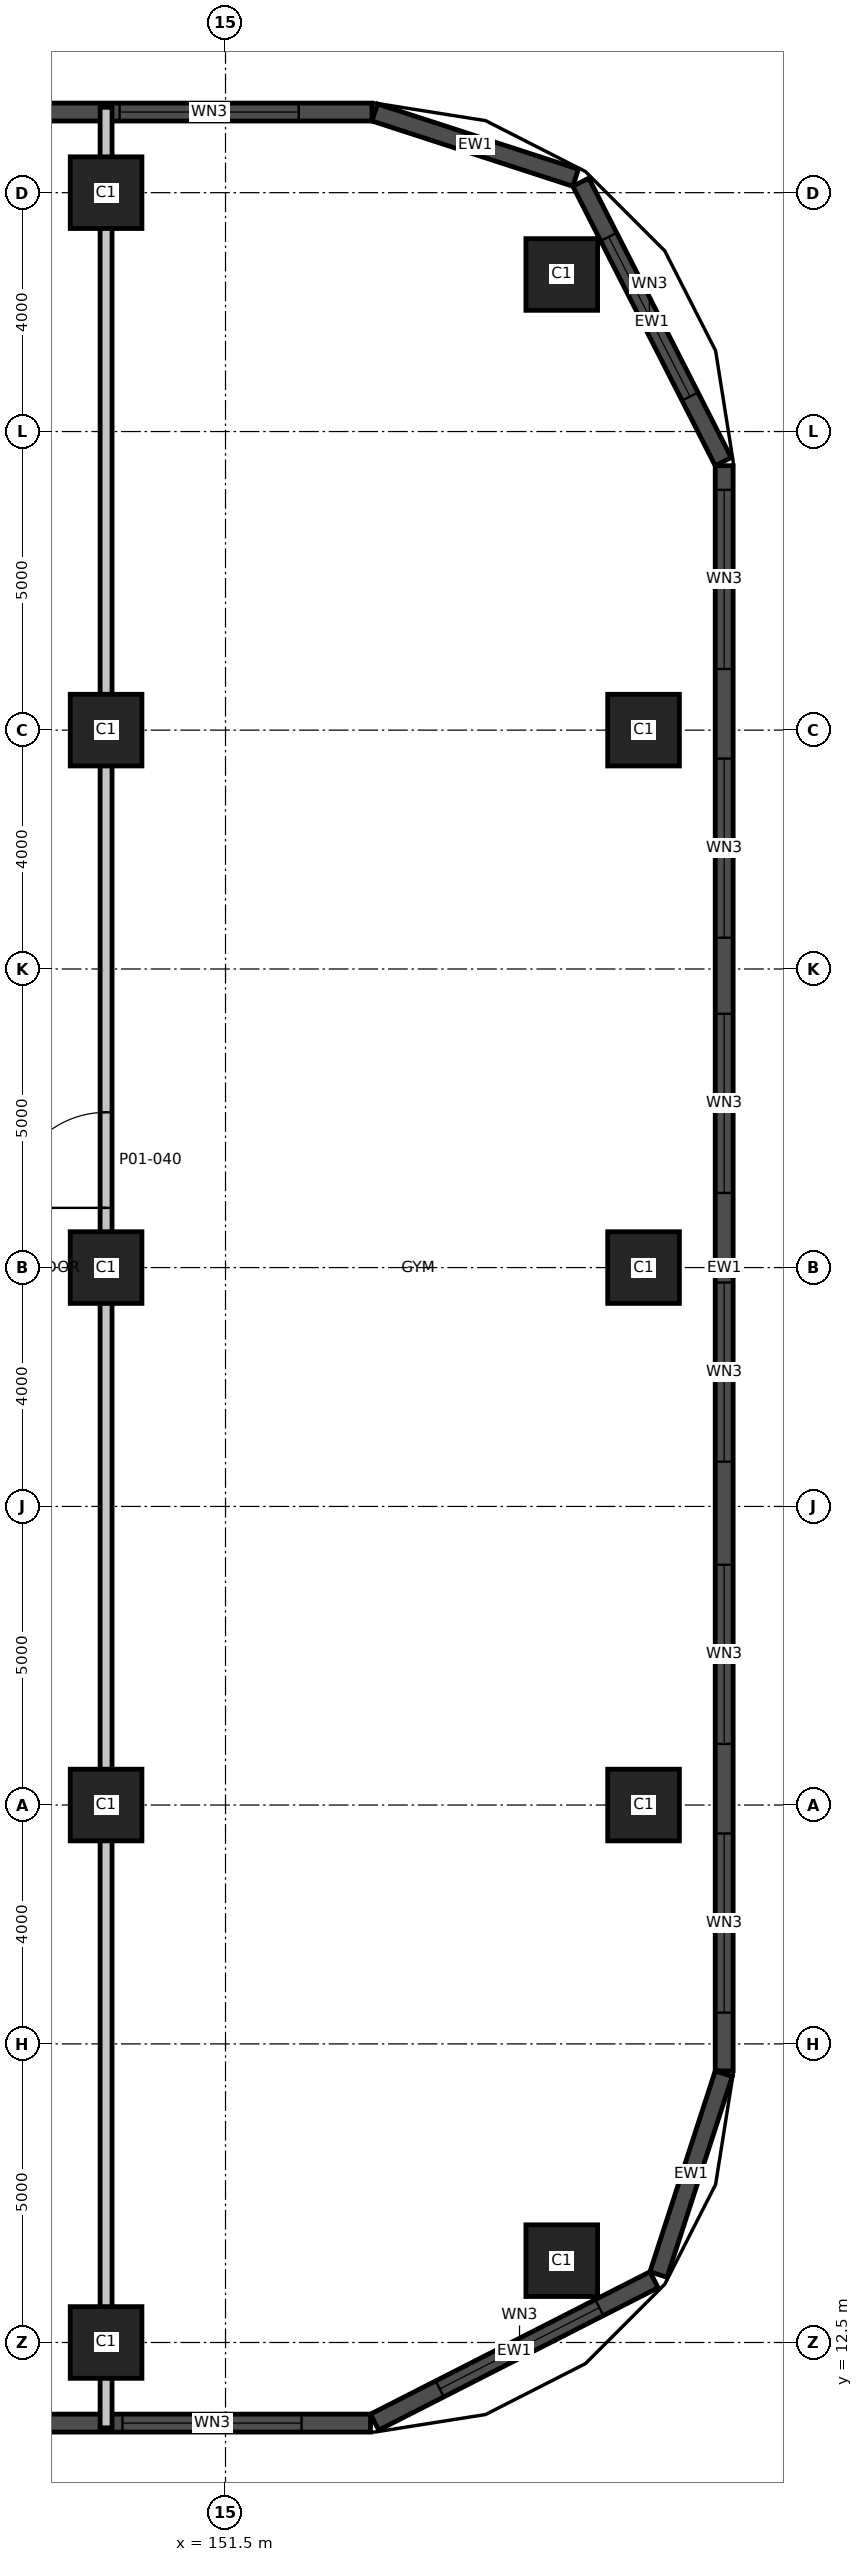
"""IFC4 building model, lengths in metres.
Left out: names, types, materials, properties, quantities, classifications, styles, units other than length and angle.
Written with IfcOpenShell. Run it as: python <this file> out.ifc"""

import sys

from ifc_helpers import new_model, si_unit, direction, frame, frame_2d, origin, origin_2d, place, context, subcontext, project, spatial, rectangle, extrude, element, fill, save


model = new_model("IFC4")
c1 = context("Model", 3, precision=1e-05, world=origin(), true_north=direction((0.0, 1.0)))
c2 = subcontext(c1, "Body", "Model", "MODEL_VIEW")
j1 = project(units=[si_unit("LENGTHUNIT", "METRE"), si_unit("PLANEANGLEUNIT", "RADIAN")], contexts=[c1])
p1 = place(None, origin())
s1 = spatial("IfcSite", under=j1, at=p1, CompositionType="ELEMENT")
p2 = place(p1, origin())
s2 = spatial("IfcBuilding", under=s1, at=p2, CompositionType="ELEMENT")
p3 = place(p2, frame((0.0, 0.0, 8.0)))
s3 = spatial("IfcBuildingStorey", under=s2, at=p3, CompositionType="ELEMENT", Elevation=8.0)
for number, where, z_axis, x_axis in (
    (1, (149.5, 12.5, 0.0), (0.0, 0.0, 1.0), (1.0, 0.0, 0.0)),
    (2, (157.13, 13.87, 0.0), (0.0, 0.0, 1.0), (1.0, 0.0, 0.0)),
    (3, (149.5, 21.5, 0.0), (0.0, 0.0, 1.0), (1.0, 0.0, 0.0)),
    (4, (158.5, 21.5, 0.0), (0.0, 0.0, 1.0), (1.0, 0.0, 0.0)),
    (5, (149.5, 30.5, 0.0), (0.0, 0.0, 1.0), (1.0, 0.0, 0.0)),
    (6, (158.5, 30.5, 0.0), (0.0, 0.0, 1.0), (1.0, 0.0, 0.0)),
    (7, (149.5, 39.5, 0.0), (0.0, 0.0, 1.0), (1.0, 0.0, 0.0)),
    (8, (158.5, 39.5, 0.0), (0.0, 0.0, 1.0), (1.0, 0.0, 0.0)),
    (9, (157.13, 47.13, 0.0), (0.0, 0.0, 1.0), (1.0, 0.0, 0.0)),
    (10, (149.5, 48.5, 0.0), (0.0, 0.0, 1.0), (1.0, 0.0, 0.0)),
):
    element("IfcColumn", number, at=place(p3, frame(where, z_axis=z_axis, x_axis=x_axis)), inside=s3, PredefinedType="COLUMN", context=c2, shape_type="SweptSolid", body=[
        extrude(rectangle(XDim=1.2, YDim=1.2, at=origin_2d()), origin(), (0.0, 0.0, 1.0), 5.5),
    ])
p4 = place(p3, frame((118.048, 11.15, 0.0), z_axis=(0.0, 0.0, 1.0), x_axis=(1.0, 0.0, 0.0)))
e11 = element("IfcWall", 11, at=p4, inside=s3, PredefinedType="SOLIDWALL", context=c2, shape_type="SweptSolid", body=[
    extrude(rectangle(XDim=35.88, YDim=0.3, at=frame_2d((17.94, 0.0))), origin(), (0.0, 0.0, 1.0), 5.2),
])
p5 = place(p4, frame((4.202, 0.0, 0.9)))
e12 = element("IfcOpeningElement", 12, at=p5, cuts=e11, PredefinedType="OPENING", context=c2, shape_type="SweptSolid", body=[
    extrude(rectangle(XDim=3.0, YDim=2.4, at=frame_2d((1.5, 1.2))), frame((0.0, 0.16, 0.0), z_axis=(0.0, -1.0, 0.0), x_axis=(1.0, 0.0, 0.0)), (0.0, 0.0, 1.0), 0.32),
])
p6 = place(p4, frame((8.702, 0.0, 0.9)))
e13 = element("IfcOpeningElement", 13, at=p6, cuts=e11, PredefinedType="OPENING", context=c2, shape_type="SweptSolid", body=[
    extrude(rectangle(XDim=3.0, YDim=2.4, at=frame_2d((1.5, 1.2))), frame((0.0, 0.16, 0.0), z_axis=(0.0, -1.0, 0.0), x_axis=(1.0, 0.0, 0.0)), (0.0, 0.0, 1.0), 0.32),
])
p7 = place(p4, frame((13.202, 0.0, 0.9)))
e14 = element("IfcOpeningElement", 14, at=p7, cuts=e11, PredefinedType="OPENING", context=c2, shape_type="SweptSolid", body=[
    extrude(rectangle(XDim=3.0, YDim=2.4, at=frame_2d((1.5, 1.2))), frame((0.0, 0.16, 0.0), z_axis=(0.0, -1.0, 0.0), x_axis=(1.0, 0.0, 0.0)), (0.0, 0.0, 1.0), 0.32),
])
p8 = place(p4, frame((17.702, 0.0, 0.9)))
e15 = element("IfcOpeningElement", 15, at=p8, cuts=e11, PredefinedType="OPENING", context=c2, shape_type="SweptSolid", body=[
    extrude(rectangle(XDim=3.0, YDim=2.4, at=frame_2d((1.5, 1.2))), frame((0.0, 0.16, 0.0), z_axis=(0.0, -1.0, 0.0), x_axis=(1.0, 0.0, 0.0)), (0.0, 0.0, 1.0), 0.32),
])
p9 = place(p4, frame((22.202, 0.0, 0.9)))
e16 = element("IfcOpeningElement", 16, at=p9, cuts=e11, PredefinedType="OPENING", context=c2, shape_type="SweptSolid", body=[
    extrude(rectangle(XDim=3.0, YDim=2.4, at=frame_2d((1.5, 1.2))), frame((0.0, 0.16, 0.0), z_axis=(0.0, -1.0, 0.0), x_axis=(1.0, 0.0, 0.0)), (0.0, 0.0, 1.0), 0.32),
])
p10 = place(p4, frame((31.726, 0.0, 0.9)))
e17 = element("IfcOpeningElement", 17, at=p10, cuts=e11, PredefinedType="OPENING", context=c2, shape_type="SweptSolid", body=[
    extrude(rectangle(XDim=3.0, YDim=2.4, at=frame_2d((1.5, 1.2))), frame((0.0, 0.16, 0.0), z_axis=(0.0, -1.0, 0.0), x_axis=(1.0, 0.0, 0.0)), (0.0, 0.0, 1.0), 0.32),
])
p11 = place(p3, frame((153.996, 11.166, 0.0), z_axis=(0.0, 0.0, 1.0), x_axis=(0.890998339455, 0.454006562826, 0.0)))
e18 = element("IfcWall", 18, at=p11, inside=s3, PredefinedType="SOLIDWALL", context=c2, shape_type="SweptSolid", body=[
    extrude(rectangle(XDim=5.252, YDim=0.3, at=frame_2d((2.626, 0.0))), origin(), (0.0, 0.0, 1.0), 5.2),
])
p12 = place(p11, frame((1.224, 0.0, 0.9)))
e19 = element("IfcOpeningElement", 19, at=p12, cuts=e18, PredefinedType="OPENING", context=c2, shape_type="SweptSolid", body=[
    extrude(rectangle(XDim=3.0, YDim=2.4, at=frame_2d((1.5, 1.2))), frame((0.0, 0.16, 0.0), z_axis=(0.0, -1.0, 0.0), x_axis=(1.0, 0.0, 0.0)), (0.0, 0.0, 1.0), 0.32),
])
p13 = place(p3, frame((158.75, 13.638, 0.0), z_axis=(0.0, 0.0, 1.0), x_axis=(0.309073584194, 0.951038127287, 0.0)))
e20 = element("IfcWall", 20, at=p13, inside=s3, PredefinedType="SOLIDWALL", context=c2, shape_type="SweptSolid", body=[
    extrude(rectangle(XDim=3.536, YDim=0.3, at=frame_2d((1.768, 0.0))), origin(), (0.0, 0.0, 1.0), 5.2),
])
p14 = place(p3, frame((159.85, 17.048, 0.0), z_axis=(0.0, 0.0, 1.0), x_axis=(0.0, 1.0, 0.0)))
e21 = element("IfcWall", 21, at=p14, inside=s3, PredefinedType="SOLIDWALL", context=c2, shape_type="SweptSolid", body=[
    extrude(rectangle(XDim=26.88, YDim=0.3, at=frame_2d((13.44, 0.0))), origin(), (0.0, 0.0, 1.0), 5.2),
])
p15 = place(p14, frame((0.976, 0.0, 0.9)))
e22 = element("IfcOpeningElement", 22, at=p15, cuts=e21, PredefinedType="OPENING", context=c2, shape_type="SweptSolid", body=[
    extrude(rectangle(XDim=3.0, YDim=2.4, at=frame_2d((1.5, 1.2))), frame((0.0, 0.16, 0.0), z_axis=(0.0, -1.0, 0.0), x_axis=(1.0, 0.0, 0.0)), (0.0, 0.0, 1.0), 0.32),
])
p16 = place(p14, frame((5.476, 0.0, 0.9)))
e23 = element("IfcOpeningElement", 23, at=p16, cuts=e21, PredefinedType="OPENING", context=c2, shape_type="SweptSolid", body=[
    extrude(rectangle(XDim=3.0, YDim=2.4, at=frame_2d((1.5, 1.2))), frame((0.0, 0.16, 0.0), z_axis=(0.0, -1.0, 0.0), x_axis=(1.0, 0.0, 0.0)), (0.0, 0.0, 1.0), 0.32),
])
p17 = place(p14, frame((10.202, 0.0, 0.9)))
e24 = element("IfcOpeningElement", 24, at=p17, cuts=e21, PredefinedType="OPENING", context=c2, shape_type="SweptSolid", body=[
    extrude(rectangle(XDim=3.0, YDim=2.4, at=frame_2d((1.5, 1.2))), frame((0.0, 0.16, 0.0), z_axis=(0.0, -1.0, 0.0), x_axis=(1.0, 0.0, 0.0)), (0.0, 0.0, 1.0), 0.32),
])
p18 = place(p14, frame((14.702, 0.0, 0.9)))
e25 = element("IfcOpeningElement", 25, at=p18, cuts=e21, PredefinedType="OPENING", context=c2, shape_type="SweptSolid", body=[
    extrude(rectangle(XDim=3.0, YDim=2.4, at=frame_2d((1.5, 1.2))), frame((0.0, 0.16, 0.0), z_axis=(0.0, -1.0, 0.0), x_axis=(1.0, 0.0, 0.0)), (0.0, 0.0, 1.0), 0.32),
])
p19 = place(p14, frame((18.976, 0.0, 0.9)))
e26 = element("IfcOpeningElement", 26, at=p19, cuts=e21, PredefinedType="OPENING", context=c2, shape_type="SweptSolid", body=[
    extrude(rectangle(XDim=3.0, YDim=2.4, at=frame_2d((1.5, 1.2))), frame((0.0, 0.16, 0.0), z_axis=(0.0, -1.0, 0.0), x_axis=(1.0, 0.0, 0.0)), (0.0, 0.0, 1.0), 0.32),
])
p20 = place(p14, frame((23.476, 0.0, 0.9)))
e27 = element("IfcOpeningElement", 27, at=p20, cuts=e21, PredefinedType="OPENING", context=c2, shape_type="SweptSolid", body=[
    extrude(rectangle(XDim=3.0, YDim=2.4, at=frame_2d((1.5, 1.2))), frame((0.0, 0.16, 0.0), z_axis=(0.0, -1.0, 0.0), x_axis=(1.0, 0.0, 0.0)), (0.0, 0.0, 1.0), 0.32),
])
p21 = place(p3, frame((159.834, 43.996, 0.0), z_axis=(0.0, 0.0, 1.0), x_axis=(-0.454006562826, 0.890998339455, 0.0)))
e28 = element("IfcWall", 28, at=p21, inside=s3, PredefinedType="SOLIDWALL", context=c2, shape_type="SweptSolid", body=[
    extrude(rectangle(XDim=5.252, YDim=0.3, at=frame_2d((2.626, 0.0))), origin(), (0.0, 0.0, 1.0), 5.2),
])
p22 = place(p21, frame((1.224, 0.0, 0.9)))
e29 = element("IfcOpeningElement", 29, at=p22, cuts=e28, PredefinedType="OPENING", context=c2, shape_type="SweptSolid", body=[
    extrude(rectangle(XDim=3.0, YDim=2.4, at=frame_2d((1.5, 1.2))), frame((0.0, 0.16, 0.0), z_axis=(0.0, -1.0, 0.0), x_axis=(1.0, 0.0, 0.0)), (0.0, 0.0, 1.0), 0.32),
])
p23 = place(p3, frame((157.362, 48.75, 0.0), z_axis=(0.0, 0.0, 1.0), x_axis=(-0.951038127287, 0.309073584194, 0.0)))
e30 = element("IfcWall", 30, at=p23, inside=s3, PredefinedType="SOLIDWALL", context=c2, shape_type="SweptSolid", body=[
    extrude(rectangle(XDim=3.536, YDim=0.3, at=frame_2d((1.768, 0.0))), origin(), (0.0, 0.0, 1.0), 5.2),
])
p24 = place(p3, frame((153.952, 49.85, 0.0), z_axis=(0.0, 0.0, 1.0), x_axis=(-1.0, 0.0, 0.0)))
e31 = element("IfcWall", 31, at=p24, inside=s3, PredefinedType="SOLIDWALL", context=c2, shape_type="SweptSolid", body=[
    extrude(rectangle(XDim=35.88, YDim=0.3, at=frame_2d((17.94, 0.0))), origin(), (0.0, 0.0, 1.0), 5.2),
])
p25 = place(p24, frame((1.226, 0.0, 0.9)))
e32 = element("IfcOpeningElement", 32, at=p25, cuts=e31, PredefinedType="OPENING", context=c2, shape_type="SweptSolid", body=[
    extrude(rectangle(XDim=3.0, YDim=2.4, at=frame_2d((1.5, 1.2))), frame((0.0, 0.16, 0.0), z_axis=(0.0, -1.0, 0.0), x_axis=(1.0, 0.0, 0.0)), (0.0, 0.0, 1.0), 0.32),
])
p26 = place(p24, frame((10.702, 0.0, 0.9)))
e33 = element("IfcOpeningElement", 33, at=p26, cuts=e31, PredefinedType="OPENING", context=c2, shape_type="SweptSolid", body=[
    extrude(rectangle(XDim=3.0, YDim=2.4, at=frame_2d((1.5, 1.2))), frame((0.0, 0.16, 0.0), z_axis=(0.0, -1.0, 0.0), x_axis=(1.0, 0.0, 0.0)), (0.0, 0.0, 1.0), 0.32),
])
p27 = place(p24, frame((19.702, 0.0, 0.9)))
e34 = element("IfcOpeningElement", 34, at=p27, cuts=e31, PredefinedType="OPENING", context=c2, shape_type="SweptSolid", body=[
    extrude(rectangle(XDim=3.0, YDim=2.4, at=frame_2d((1.5, 1.2))), frame((0.0, 0.16, 0.0), z_axis=(0.0, -1.0, 0.0), x_axis=(1.0, 0.0, 0.0)), (0.0, 0.0, 1.0), 0.32),
])
p28 = place(p24, frame((24.202, 0.0, 0.9)))
e35 = element("IfcOpeningElement", 35, at=p28, cuts=e31, PredefinedType="OPENING", context=c2, shape_type="SweptSolid", body=[
    extrude(rectangle(XDim=3.0, YDim=2.4, at=frame_2d((1.5, 1.2))), frame((0.0, 0.16, 0.0), z_axis=(0.0, -1.0, 0.0), x_axis=(1.0, 0.0, 0.0)), (0.0, 0.0, 1.0), 0.32),
])
p29 = place(p24, frame((28.702, 0.0, 0.9)))
e36 = element("IfcOpeningElement", 36, at=p29, cuts=e31, PredefinedType="OPENING", context=c2, shape_type="SweptSolid", body=[
    extrude(rectangle(XDim=3.0, YDim=2.4, at=frame_2d((1.5, 1.2))), frame((0.0, 0.16, 0.0), z_axis=(0.0, -1.0, 0.0), x_axis=(1.0, 0.0, 0.0)), (0.0, 0.0, 1.0), 0.32),
])
p30 = place(p3, frame((149.5, 11.07, 0.0), z_axis=(0.0, 0.0, 1.0), x_axis=(0.0, 1.0, 0.0)))
e37 = element("IfcWall", 37, at=p30, inside=s3, PredefinedType="PARTITIONING", context=c2, shape_type="SweptSolid", body=[
    extrude(rectangle(XDim=38.86, YDim=0.2, at=frame_2d((19.43, 0.0))), origin(), (0.0, 0.0, 1.0), 5.2),
])
p31 = place(p30, frame((20.43, 0.0, 0.0)))
e38 = element("IfcOpeningElement", 38, at=p31, cuts=e37, PredefinedType="OPENING", context=c2, shape_type="SweptSolid", body=[
    extrude(rectangle(XDim=1.6, YDim=2.1, at=frame_2d((0.8, 1.05))), frame((0.0, 0.11, 0.0), z_axis=(0.0, -1.0, 0.0), x_axis=(1.0, 0.0, 0.0)), (0.0, 0.0, 1.0), 0.22),
])
p32 = place(p10, origin())
e39 = element("IfcWindow", 39, at=p32, inside=s3, PartitioningType="SINGLE_PANEL", PredefinedType="WINDOW", context=c2, shape_type="SweptSolid", body=[
    extrude(rectangle(XDim=3.0, YDim=2.4, at=frame_2d((1.5, 1.2))), frame((0.0, 0.03, 0.0), z_axis=(0.0, -1.0, 0.0), x_axis=(1.0, 0.0, 0.0)), (0.0, 0.0, 1.0), 0.06),
])
fill(e17, e39)
p33 = place(p12, origin())
e40 = element("IfcWindow", 40, at=p33, inside=s3, PartitioningType="SINGLE_PANEL", PredefinedType="WINDOW", context=c2, shape_type="SweptSolid", body=[
    extrude(rectangle(XDim=3.0, YDim=2.4, at=frame_2d((1.5, 1.2))), frame((0.0, 0.03, 0.0), z_axis=(0.0, -1.0, 0.0), x_axis=(1.0, 0.0, 0.0)), (0.0, 0.0, 1.0), 0.06),
])
fill(e19, e40)
p34 = place(p15, origin())
e41 = element("IfcWindow", 41, at=p34, inside=s3, PartitioningType="SINGLE_PANEL", PredefinedType="WINDOW", context=c2, shape_type="SweptSolid", body=[
    extrude(rectangle(XDim=3.0, YDim=2.4, at=frame_2d((1.5, 1.2))), frame((0.0, 0.03, 0.0), z_axis=(0.0, -1.0, 0.0), x_axis=(1.0, 0.0, 0.0)), (0.0, 0.0, 1.0), 0.06),
])
fill(e22, e41)
p35 = place(p16, origin())
e42 = element("IfcWindow", 42, at=p35, inside=s3, PartitioningType="SINGLE_PANEL", PredefinedType="WINDOW", context=c2, shape_type="SweptSolid", body=[
    extrude(rectangle(XDim=3.0, YDim=2.4, at=frame_2d((1.5, 1.2))), frame((0.0, 0.03, 0.0), z_axis=(0.0, -1.0, 0.0), x_axis=(1.0, 0.0, 0.0)), (0.0, 0.0, 1.0), 0.06),
])
fill(e23, e42)
p36 = place(p17, origin())
e43 = element("IfcWindow", 43, at=p36, inside=s3, PartitioningType="SINGLE_PANEL", PredefinedType="WINDOW", context=c2, shape_type="SweptSolid", body=[
    extrude(rectangle(XDim=3.0, YDim=2.4, at=frame_2d((1.5, 1.2))), frame((0.0, 0.03, 0.0), z_axis=(0.0, -1.0, 0.0), x_axis=(1.0, 0.0, 0.0)), (0.0, 0.0, 1.0), 0.06),
])
fill(e24, e43)
p37 = place(p18, origin())
e44 = element("IfcWindow", 44, at=p37, inside=s3, PartitioningType="SINGLE_PANEL", PredefinedType="WINDOW", context=c2, shape_type="SweptSolid", body=[
    extrude(rectangle(XDim=3.0, YDim=2.4, at=frame_2d((1.5, 1.2))), frame((0.0, 0.03, 0.0), z_axis=(0.0, -1.0, 0.0), x_axis=(1.0, 0.0, 0.0)), (0.0, 0.0, 1.0), 0.06),
])
fill(e25, e44)
p38 = place(p19, origin())
e45 = element("IfcWindow", 45, at=p38, inside=s3, PartitioningType="SINGLE_PANEL", PredefinedType="WINDOW", context=c2, shape_type="SweptSolid", body=[
    extrude(rectangle(XDim=3.0, YDim=2.4, at=frame_2d((1.5, 1.2))), frame((0.0, 0.03, 0.0), z_axis=(0.0, -1.0, 0.0), x_axis=(1.0, 0.0, 0.0)), (0.0, 0.0, 1.0), 0.06),
])
fill(e26, e45)
p39 = place(p20, origin())
e46 = element("IfcWindow", 46, at=p39, inside=s3, PartitioningType="SINGLE_PANEL", PredefinedType="WINDOW", context=c2, shape_type="SweptSolid", body=[
    extrude(rectangle(XDim=3.0, YDim=2.4, at=frame_2d((1.5, 1.2))), frame((0.0, 0.03, 0.0), z_axis=(0.0, -1.0, 0.0), x_axis=(1.0, 0.0, 0.0)), (0.0, 0.0, 1.0), 0.06),
])
fill(e27, e46)
p40 = place(p22, origin())
e47 = element("IfcWindow", 47, at=p40, inside=s3, PartitioningType="SINGLE_PANEL", PredefinedType="WINDOW", context=c2, shape_type="SweptSolid", body=[
    extrude(rectangle(XDim=3.0, YDim=2.4, at=frame_2d((1.5, 1.2))), frame((0.0, 0.03, 0.0), z_axis=(0.0, -1.0, 0.0), x_axis=(1.0, 0.0, 0.0)), (0.0, 0.0, 1.0), 0.06),
])
fill(e29, e47)
p41 = place(p25, origin())
e48 = element("IfcWindow", 48, at=p41, inside=s3, PartitioningType="SINGLE_PANEL", PredefinedType="WINDOW", context=c2, shape_type="SweptSolid", body=[
    extrude(rectangle(XDim=3.0, YDim=2.4, at=frame_2d((1.5, 1.2))), frame((0.0, 0.03, 0.0), z_axis=(0.0, -1.0, 0.0), x_axis=(1.0, 0.0, 0.0)), (0.0, 0.0, 1.0), 0.06),
])
fill(e32, e48)
p42 = place(p31, origin())
e49 = element("IfcDoor", 49, at=p42, inside=s3, OperationType="SINGLE_SWING_RIGHT", PredefinedType="DOOR", context=c2, shape_type="SweptSolid", body=[
    extrude(rectangle(XDim=1.6, YDim=2.1, at=frame_2d((0.8, 1.05))), frame((0.0, 0.025, 0.0), z_axis=(0.0, -1.0, 0.0), x_axis=(1.0, 0.0, 0.0)), (0.0, 0.0, 1.0), 0.05),
])
fill(e38, e49)
save(model, sys.argv[1])
